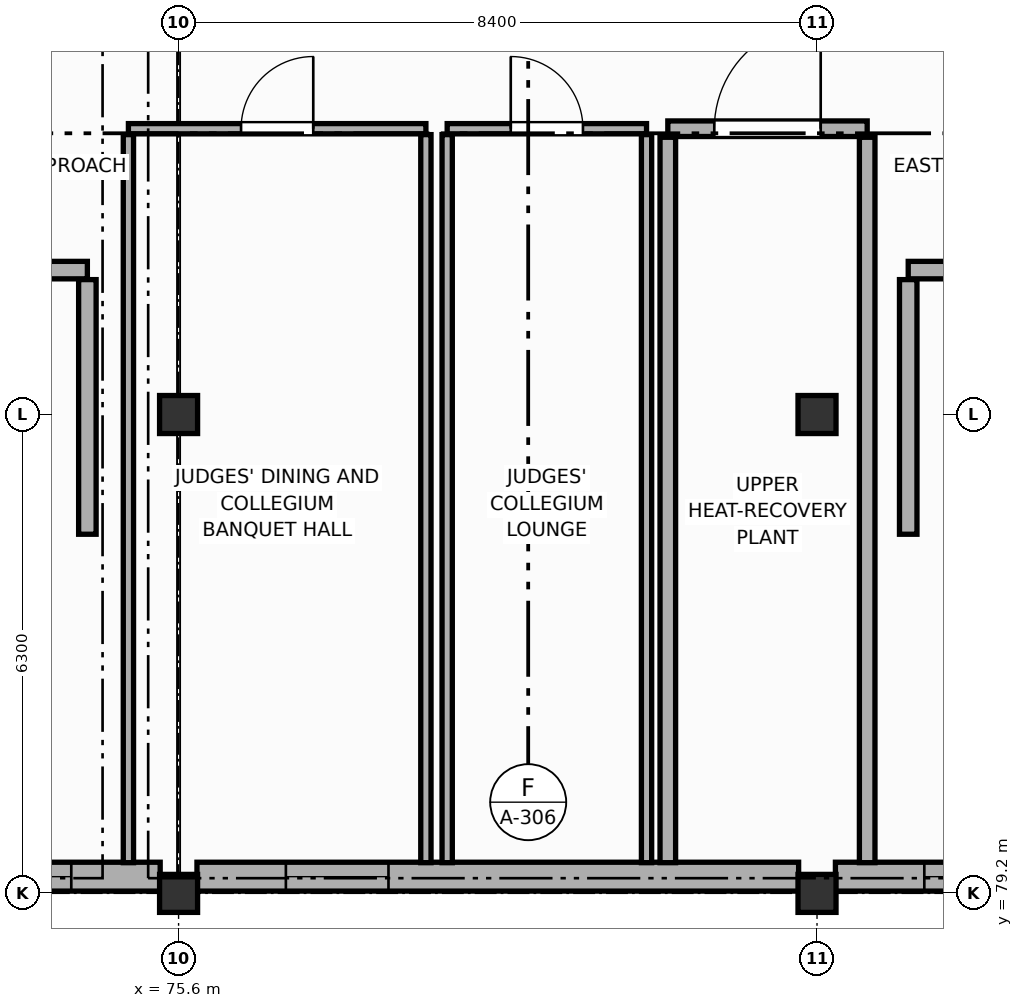
"""IFC4 building model, lengths in metres.
Left out: names, types, materials, properties, quantities, classifications, styles, units other than length and angle.
Written with IfcOpenShell. Run it as: python <this file> out.ifc"""

import sys

from ifc_helpers import new_model, si_unit, direction, frame, frame_2d, origin, origin_2d, place, context, subcontext, project, spatial, rectangle, extrude, element, fill, save


model = new_model("IFC4")
c1 = context("Model", 3, precision=1e-05, world=origin(), true_north=direction((0.0, 1.0)))
c2 = subcontext(c1, "Body", "Model", "MODEL_VIEW")
j1 = project(units=[si_unit("LENGTHUNIT", "METRE"), si_unit("PLANEANGLEUNIT", "RADIAN")], contexts=[c1])
p1 = place(None, origin())
s1 = spatial("IfcSite", under=j1, at=p1, CompositionType="ELEMENT")
p2 = place(p1, origin())
s2 = spatial("IfcBuilding", under=s1, at=p2, CompositionType="ELEMENT")
p3 = place(p2, frame((0.0, 0.0, 35.4)))
s3 = spatial("IfcBuildingStorey", under=s2, at=p3, CompositionType="ELEMENT", Elevation=35.4)
for number, where, z_axis, x_axis in (
    (1, (75.6, 79.2, 0.0), (0.0, 0.0, 1.0), (1.0, 0.0, 0.0)),
    (2, (75.6, 85.5, 0.0), (0.0, 0.0, 1.0), (1.0, 0.0, 0.0)),
    (3, (84.0, 79.2, 0.0), (0.0, 0.0, 1.0), (1.0, 0.0, 0.0)),
    (4, (84.0, 85.5, 0.0), (0.0, 0.0, 1.0), (1.0, 0.0, 0.0)),
):
    element("IfcColumn", number, at=place(p3, frame(where, z_axis=z_axis, x_axis=x_axis)), inside=s3, PredefinedType="COLUMN", context=c2, shape_type="SweptSolid", body=[
        extrude(rectangle(XDim=0.5, YDim=0.5, at=origin_2d()), origin(), (0.0, 0.0, 1.0), 4.2),
    ])
p4 = place(p3, frame((75.358, 79.42, 0.0), z_axis=(0.0, 0.0, 1.0), x_axis=(-1.0, 0.0, 0.0)))
e5 = element("IfcWall", 5, at=p4, inside=s3, PredefinedType="STANDARD", context=c2, shape_type="SweptSolid", body=[
    extrude(rectangle(XDim=7.916, YDim=0.38, at=frame_2d((3.958, 0.0))), origin(), (0.0, 0.0, 1.0), 3.495),
])
p5 = place(p4, frame((1.17, 0.0, 0.85)))
e6 = element("IfcOpeningElement", 6, at=p5, cuts=e5, PredefinedType="OPENING", context=c2, shape_type="SweptSolid", body=[
    extrude(rectangle(XDim=1.35, YDim=1.95, at=frame_2d((0.675, 0.975))), frame((0.0, 0.2, 0.0), z_axis=(0.0, -1.0, 0.0), x_axis=(1.0, 0.0, 0.0)), (0.0, 0.0, 1.0), 0.4),
])
p6 = place(p4, frame((3.283, 0.0, 0.85)))
e7 = element("IfcOpeningElement", 7, at=p6, cuts=e5, PredefinedType="OPENING", context=c2, shape_type="SweptSolid", body=[
    extrude(rectangle(XDim=1.35, YDim=1.95, at=frame_2d((0.675, 0.975))), frame((0.0, 0.2, 0.0), z_axis=(0.0, -1.0, 0.0), x_axis=(1.0, 0.0, 0.0)), (0.0, 0.0, 1.0), 0.4),
])
p7 = place(p4, frame((5.396, 0.0, 0.85)))
e8 = element("IfcOpeningElement", 8, at=p7, cuts=e5, PredefinedType="OPENING", context=c2, shape_type="SweptSolid", body=[
    extrude(rectangle(XDim=1.35, YDim=1.95, at=frame_2d((0.675, 0.975))), frame((0.0, 0.2, 0.0), z_axis=(0.0, -1.0, 0.0), x_axis=(1.0, 0.0, 0.0)), (0.0, 0.0, 1.0), 0.4),
])
p8 = place(p3, frame((83.758, 79.42, 0.0), z_axis=(0.0, 0.0, 1.0), x_axis=(-1.0, 0.0, 0.0)))
e9 = element("IfcWall", 9, at=p8, inside=s3, PredefinedType="STANDARD", context=c2, shape_type="SweptSolid", body=[
    extrude(rectangle(XDim=7.916, YDim=0.38, at=frame_2d((3.958, 0.0))), origin(), (0.0, 0.0, 1.0), 3.495),
])
p9 = place(p8, frame((5.396, 0.0, 0.85)))
e10 = element("IfcOpeningElement", 10, at=p9, cuts=e9, PredefinedType="OPENING", context=c2, shape_type="SweptSolid", body=[
    extrude(rectangle(XDim=1.35, YDim=1.95, at=frame_2d((0.675, 0.975))), frame((0.0, 0.2, 0.0), z_axis=(0.0, -1.0, 0.0), x_axis=(1.0, 0.0, 0.0)), (0.0, 0.0, 1.0), 0.4),
])
p10 = place(p3, frame((92.158, 79.42, 0.0), z_axis=(0.0, 0.0, 1.0), x_axis=(-1.0, 0.0, 0.0)))
e11 = element("IfcWall", 11, at=p10, inside=s3, PredefinedType="STANDARD", context=c2, shape_type="SweptSolid", body=[
    extrude(rectangle(XDim=7.916, YDim=0.38, at=frame_2d((3.958, 0.0))), origin(), (0.0, 0.0, 1.0), 3.495),
])
p11 = place(p10, frame((1.17, 0.0, 0.85)))
e12 = element("IfcOpeningElement", 12, at=p11, cuts=e11, PredefinedType="OPENING", context=c2, shape_type="SweptSolid", body=[
    extrude(rectangle(XDim=1.35, YDim=1.95, at=frame_2d((0.675, 0.975))), frame((0.0, 0.2, 0.0), z_axis=(0.0, -1.0, 0.0), x_axis=(1.0, 0.0, 0.0)), (0.0, 0.0, 1.0), 0.4),
])
p12 = place(p10, frame((3.283, 0.0, 0.85)))
e13 = element("IfcOpeningElement", 13, at=p12, cuts=e11, PredefinedType="OPENING", context=c2, shape_type="SweptSolid", body=[
    extrude(rectangle(XDim=1.35, YDim=1.95, at=frame_2d((0.675, 0.975))), frame((0.0, 0.2, 0.0), z_axis=(0.0, -1.0, 0.0), x_axis=(1.0, 0.0, 0.0)), (0.0, 0.0, 1.0), 0.4),
])
p13 = place(p10, frame((5.396, 0.0, 0.85)))
e14 = element("IfcOpeningElement", 14, at=p13, cuts=e11, PredefinedType="OPENING", context=c2, shape_type="SweptSolid", body=[
    extrude(rectangle(XDim=1.35, YDim=1.95, at=frame_2d((0.675, 0.975))), frame((0.0, 0.2, 0.0), z_axis=(0.0, -1.0, 0.0), x_axis=(1.0, 0.0, 0.0)), (0.0, 0.0, 1.0), 0.4),
])
p14 = place(p3, frame((102.0, 79.35, 4.2), z_axis=(0.0, 0.0, 1.0), x_axis=(-1.0, 0.0, 0.0)))
e15 = element("IfcWall", 15, at=p14, inside=s3, PredefinedType="PARAPET", context=c2, shape_type="SweptSolid", body=[
    extrude(rectangle(XDim=43.2, YDim=0.245, at=frame_2d((21.6, 0.0))), origin(), (0.0, 0.0, 1.0), 1.15),
])
p15 = place(p3, frame((69.0, 87.4, 0.0), z_axis=(0.0, 0.0, 1.0), x_axis=(1.0, 0.0, 0.0)))
e16 = element("IfcWall", 16, at=p15, inside=s3, PredefinedType="STANDARD", context=c2, shape_type="SweptSolid", body=[
    extrude(rectangle(XDim=5.4, YDim=0.23, at=frame_2d((2.7, 0.0))), origin(), (0.0, 0.0, 1.0), 3.95),
])
p16 = place(p15, frame((2.05, 0.0, 0.0)))
e17 = element("IfcOpeningElement", 17, at=p16, cuts=e16, PredefinedType="OPENING", context=c2, shape_type="SweptSolid", body=[
    extrude(rectangle(XDim=1.3, YDim=2.2, at=frame_2d((0.65, 1.1))), frame((0.0, 0.125, 0.0), z_axis=(0.0, -1.0, 0.0), x_axis=(1.0, 0.0, 0.0)), (0.0, 0.0, 1.0), 0.25),
])
p17 = place(p3, frame((74.4, 87.275, 0.0), z_axis=(0.0, 0.0, 1.0), x_axis=(0.0, -1.0, 0.0)))
e18 = element("IfcWall", 18, at=p17, inside=s3, PredefinedType="STANDARD", context=c2, shape_type="SweptSolid", body=[
    extrude(rectangle(XDim=3.35, YDim=0.23, at=frame_2d((1.675, 0.0))), origin(), (0.0, 0.0, 1.0), 3.395),
])
p18 = place(p3, frame((85.2, 87.4, 0.0), z_axis=(0.0, 0.0, 1.0), x_axis=(1.0, 0.0, 0.0)))
e19 = element("IfcWall", 19, at=p18, inside=s3, PredefinedType="STANDARD", context=c2, shape_type="SweptSolid", body=[
    extrude(rectangle(XDim=5.4, YDim=0.23, at=frame_2d((2.7, 0.0))), origin(), (0.0, 0.0, 1.0), 3.95),
])
p19 = place(p18, frame((2.05, 0.0, 0.0)))
e20 = element("IfcOpeningElement", 20, at=p19, cuts=e19, PredefinedType="OPENING", context=c2, shape_type="SweptSolid", body=[
    extrude(rectangle(XDim=1.3, YDim=2.2, at=frame_2d((0.65, 1.1))), frame((0.0, 0.125, 0.0), z_axis=(0.0, -1.0, 0.0), x_axis=(1.0, 0.0, 0.0)), (0.0, 0.0, 1.0), 0.25),
])
p20 = place(p3, frame((85.2, 83.925, 0.0), z_axis=(0.0, 0.0, 1.0), x_axis=(0.0, 1.0, 0.0)))
e21 = element("IfcWall", 21, at=p20, inside=s3, PredefinedType="STANDARD", context=c2, shape_type="SweptSolid", body=[
    extrude(rectangle(XDim=3.35, YDim=0.23, at=frame_2d((1.675, 0.0))), origin(), (0.0, 0.0, 1.0), 3.395),
])
p21 = place(p3, frame((74.94, 89.26, 0.0), z_axis=(0.0, 0.0, 1.0), x_axis=(1.0, 0.0, 0.0)))
e22 = element("IfcWall", 22, at=p21, inside=s3, PredefinedType="PARTITIONING", context=c2, shape_type="SweptSolid", body=[
    extrude(rectangle(XDim=3.914, YDim=0.135, at=frame_2d((1.957, 0.0))), origin(), (0.0, 0.0, 1.0), 3.495),
])
p22 = place(p21, frame((1.482, 0.0, 0.0)))
e23 = element("IfcOpeningElement", 23, at=p22, cuts=e22, PredefinedType="OPENING", context=c2, shape_type="SweptSolid", body=[
    extrude(rectangle(XDim=0.95, YDim=2.15, at=frame_2d((0.475, 1.075))), frame((0.0, 0.077, 0.0), z_axis=(0.0, -1.0, 0.0), x_axis=(1.0, 0.0, 0.0)), (0.0, 0.0, 1.0), 0.155),
])
for number, where, z_axis, x_axis in (
    (24, (74.94, 79.604, 0.0), (0.0, 0.0, 1.0), (0.0, 1.0, 0.0)),
    (25, (78.854, 89.183, 0.0), (0.0, 0.0, 1.0), (0.0, -1.0, 0.0)),
):
    element("IfcWall", number, at=place(p3, frame(where, z_axis=z_axis, x_axis=x_axis)), inside=s3, PredefinedType="PARTITIONING", context=c2, shape_type="SweptSolid", body=[
        extrude(rectangle(XDim=9.579, YDim=0.135, at=frame_2d((4.789, 0.0))), origin(), (0.0, 0.0, 1.0), 3.395),
    ])
p23 = place(p3, frame((79.134, 89.26, 0.0), z_axis=(0.0, 0.0, 1.0), x_axis=(1.0, 0.0, 0.0)))
e26 = element("IfcWall", 26, at=p23, inside=s3, PredefinedType="PARTITIONING", context=c2, shape_type="SweptSolid", body=[
    extrude(rectangle(XDim=2.623, YDim=0.135, at=frame_2d((1.312, 0.0))), origin(), (0.0, 0.0, 1.0), 3.95),
])
p24 = place(p23, frame((0.836, 0.0, 0.0)))
e27 = element("IfcOpeningElement", 27, at=p24, cuts=e26, PredefinedType="OPENING", context=c2, shape_type="SweptSolid", body=[
    extrude(rectangle(XDim=0.95, YDim=2.15, at=frame_2d((0.475, 1.075))), frame((0.0, 0.077, 0.0), z_axis=(0.0, -1.0, 0.0), x_axis=(1.0, 0.0, 0.0)), (0.0, 0.0, 1.0), 0.155),
])
for number, where, z_axis, x_axis in (
    (28, (79.134, 79.604, 0.0), (0.0, 0.0, 1.0), (0.0, 1.0, 0.0)),
    (29, (81.757, 89.183, 0.0), (0.0, 0.0, 1.0), (0.0, -1.0, 0.0)),
):
    element("IfcWall", number, at=place(p3, frame(where, z_axis=z_axis, x_axis=x_axis)), inside=s3, PredefinedType="PARTITIONING", context=c2, shape_type="SweptSolid", body=[
        extrude(rectangle(XDim=9.579, YDim=0.135, at=frame_2d((4.789, 0.0))), origin(), (0.0, 0.0, 1.0), 3.395),
    ])
p25 = place(p3, frame((82.037, 89.26, 0.0), z_axis=(0.0, 0.0, 1.0), x_axis=(1.0, 0.0, 0.0)))
e30 = element("IfcWall", 30, at=p25, inside=s3, PredefinedType="STANDARD", context=c2, shape_type="SweptSolid", body=[
    extrude(rectangle(XDim=2.623, YDim=0.205, at=frame_2d((1.312, 0.0))), origin(), (0.0, 0.0, 1.0), 3.495),
])
p26 = place(p25, frame((0.612, 0.0, 0.0)))
e31 = element("IfcOpeningElement", 31, at=p26, cuts=e30, PredefinedType="OPENING", context=c2, shape_type="SweptSolid", body=[
    extrude(rectangle(XDim=1.4, YDim=2.25, at=frame_2d((0.7, 1.125))), frame((0.0, 0.113, 0.0), z_axis=(0.0, -1.0, 0.0), x_axis=(1.0, 0.0, 0.0)), (0.0, 0.0, 1.0), 0.225),
])
for number, where, z_axis, x_axis in (
    (32, (82.037, 79.604, 0.0), (0.0, 0.0, 1.0), (0.0, 1.0, 0.0)),
    (33, (84.66, 89.147, 0.0), (0.0, 0.0, 1.0), (0.0, -1.0, 0.0)),
):
    element("IfcWall", number, at=place(p3, frame(where, z_axis=z_axis, x_axis=x_axis)), inside=s3, PredefinedType="STANDARD", context=c2, shape_type="SweptSolid", body=[
        extrude(rectangle(XDim=9.543, YDim=0.205, at=frame_2d((4.772, 0.0))), origin(), (0.0, 0.0, 1.0), 3.395),
    ])
p27 = place(p5, origin())
e34 = element("IfcWindow", 34, at=p27, inside=s3, PartitioningType="SINGLE_PANEL", PredefinedType="WINDOW", context=c2, shape_type="SweptSolid", body=[
    extrude(rectangle(XDim=1.35, YDim=1.95, at=frame_2d((0.675, 0.975))), frame((0.0, 0.03, 0.0), z_axis=(0.0, -1.0, 0.0), x_axis=(1.0, 0.0, 0.0)), (0.0, 0.0, 1.0), 0.06),
])
fill(e6, e34)
p28 = place(p9, origin())
e35 = element("IfcWindow", 35, at=p28, inside=s3, PartitioningType="SINGLE_PANEL", PredefinedType="WINDOW", context=c2, shape_type="SweptSolid", body=[
    extrude(rectangle(XDim=1.35, YDim=1.95, at=frame_2d((0.675, 0.975))), frame((0.0, 0.03, 0.0), z_axis=(0.0, -1.0, 0.0), x_axis=(1.0, 0.0, 0.0)), (0.0, 0.0, 1.0), 0.06),
])
fill(e10, e35)
p29 = place(p13, origin())
e36 = element("IfcWindow", 36, at=p29, inside=s3, PartitioningType="SINGLE_PANEL", PredefinedType="WINDOW", context=c2, shape_type="SweptSolid", body=[
    extrude(rectangle(XDim=1.35, YDim=1.95, at=frame_2d((0.675, 0.975))), frame((0.0, 0.03, 0.0), z_axis=(0.0, -1.0, 0.0), x_axis=(1.0, 0.0, 0.0)), (0.0, 0.0, 1.0), 0.06),
])
fill(e14, e36)
p30 = place(p22, origin())
e37 = element("IfcDoor", 37, at=p30, inside=s3, OperationType="SINGLE_SWING_RIGHT", PredefinedType="DOOR", context=c2, shape_type="SweptSolid", body=[
    extrude(rectangle(XDim=0.95, YDim=2.15, at=frame_2d((0.475, 1.075))), frame((0.0, 0.025, 0.0), z_axis=(0.0, -1.0, 0.0), x_axis=(1.0, 0.0, 0.0)), (0.0, 0.0, 1.0), 0.05),
])
fill(e23, e37)
p31 = place(p24, origin())
e38 = element("IfcDoor", 38, at=p31, inside=s3, OperationType="SINGLE_SWING_LEFT", PredefinedType="DOOR", context=c2, shape_type="SweptSolid", body=[
    extrude(rectangle(XDim=0.95, YDim=2.15, at=frame_2d((0.475, 1.075))), frame((0.0, 0.025, 0.0), z_axis=(0.0, -1.0, 0.0), x_axis=(1.0, 0.0, 0.0)), (0.0, 0.0, 1.0), 0.05),
])
fill(e27, e38)
p32 = place(p26, origin())
e39 = element("IfcDoor", 39, at=p32, inside=s3, OperationType="SINGLE_SWING_RIGHT", PredefinedType="DOOR", context=c2, shape_type="SweptSolid", body=[
    extrude(rectangle(XDim=1.4, YDim=2.25, at=frame_2d((0.7, 1.125))), frame((0.0, 0.025, 0.0), z_axis=(0.0, -1.0, 0.0), x_axis=(1.0, 0.0, 0.0)), (0.0, 0.0, 1.0), 0.05),
])
fill(e31, e39)
save(model, sys.argv[1])
